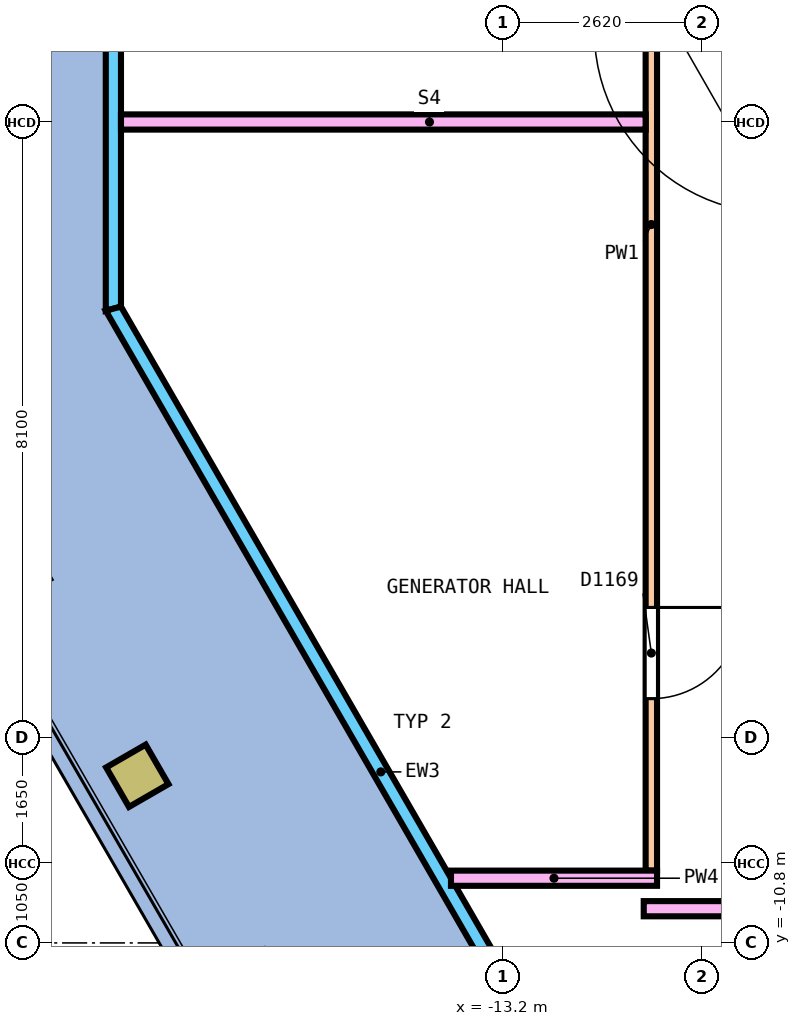
"""IFC4 building model, lengths in metres.
Left out: names, types, materials, properties, quantities, classifications, styles, units other than length and angle.
Written with IfcOpenShell. Run it as: python <this file> out.ifc"""

import sys

from ifc_helpers import new_model, si_unit, direction, frame, frame_2d, origin, origin_2d, place, context, subcontext, project, spatial, polyline, rectangle, hollow_rectangle, outline, extrude, element, fill, save


model = new_model("IFC4")
c1 = context("Model", 3, precision=1e-05, world=origin(), true_north=direction((0.0, 1.0)))
c2 = subcontext(c1, "Body", "Model", "MODEL_VIEW")
j1 = project(units=[si_unit("LENGTHUNIT", "METRE"), si_unit("PLANEANGLEUNIT", "RADIAN")], contexts=[c1])
p1 = place(None, origin())
s1 = spatial("IfcSite", under=j1, at=p1, CompositionType="ELEMENT")
p2 = place(p1, origin())
s2 = spatial("IfcBuilding", under=s1, at=p2, CompositionType="ELEMENT")
p3 = place(p2, frame((0.0, 0.0, 344.6)))
s3 = spatial("IfcBuildingStorey", under=s2, at=p3, CompositionType="ELEMENT", Elevation=344.6)
p4 = place(p3, frame((-18.013, -8.601, 0.0), z_axis=(0.0, 0.0, 1.0), x_axis=(0.5, -0.866025403784, 0.0)))
e1 = element("IfcColumn", 1, at=p4, inside=s3, PredefinedType="COLUMN", context=c2, shape_type="SweptSolid", body=[
    extrude(hollow_rectangle(XDim=0.6, YDim=0.6, WallThickness=0.04, InnerFilletRadius=0.04, OuterFilletRadius=0.08, at=origin_2d()), origin(), (0.0, 0.0, 1.0), 4.0),
])
p5 = place(p3, frame((-18.327, 2.456, 0.0), z_axis=(0.0, 0.0, 1.0), x_axis=(0.0, -1.0, 0.0)))
e2 = element("IfcWall", 2, at=p5, inside=s3, PredefinedType="SOLIDWALL", context=c2, shape_type="SweptSolid", body=[
    extrude(outline(polyline([(-0.027, -0.1), (4.938, -0.1), (4.885, 0.1), (0.027, 0.1), (-0.027, -0.1)])), origin(), (0.0, 0.0, 1.0), 3.8),
])
p6 = place(p3, frame((-18.327, -2.456, 0.0), z_axis=(0.0, 0.0, 1.0), x_axis=(0.499991740577, -0.866030172312, 0.0)))
e3 = element("IfcWall", 3, at=p6, inside=s3, PredefinedType="SOLIDWALL", context=c2, shape_type="SweptSolid", body=[
    extrude(outline(polyline([(-0.027, -0.1), (14.101, -0.1), (14.047, 0.1), (0.027, 0.1), (-0.027, -0.1)])), origin(), (0.0, 0.0, 1.0), 3.8),
])
p7 = place(p3, frame((-11.25, -9.849, 0.0), z_axis=(0.0, 0.0, 1.0), x_axis=(0.0, 1.0, 0.0)))
e4 = element("IfcWall", 4, at=p7, inside=s3, PredefinedType="PARTITIONING", context=c2, shape_type="SweptSolid", body=[
    extrude(rectangle(XDim=17.0, YDim=0.15, at=frame_2d((8.5, 0.0))), origin(), (0.0, 0.0, 1.0), 3.3),
])
p8 = place(p7, frame((14.212, 0.0, 0.0)))
e5 = element("IfcOpeningElement", 5, at=p8, cuts=e4, PredefinedType="OPENING", context=c2, shape_type="SweptSolid", body=[
    extrude(rectangle(XDim=1.2, YDim=2.1, at=frame_2d((0.6, 1.05))), frame((0.0, 0.085, 0.0), z_axis=(0.0, -1.0, 0.0), x_axis=(1.0, 0.0, 0.0)), (0.0, 0.0, 1.0), 0.17),
])
p9 = place(p7, frame((2.262, 0.0, 0.0)))
e6 = element("IfcOpeningElement", 6, at=p9, cuts=e4, PredefinedType="OPENING", context=c2, shape_type="SweptSolid", body=[
    extrude(rectangle(XDim=1.2, YDim=2.1, at=frame_2d((0.6, 1.05))), frame((0.0, 0.085, 0.0), z_axis=(0.0, -1.0, 0.0), x_axis=(1.0, 0.0, 0.0)), (0.0, 0.0, 1.0), 0.17),
])
p10 = place(p3, frame((-11.35, -10.35, 0.0), z_axis=(0.0, 0.0, 1.0), x_axis=(1.0, 0.0, 0.0)))
e7 = element("IfcWall", 7, at=p10, inside=s3, PredefinedType="PARTITIONING", context=c2, shape_type="SweptSolid", body=[
    extrude(rectangle(XDim=22.7, YDim=0.2, at=frame_2d((11.35, 0.0))), origin(), (0.0, 0.0, 1.0), 3.8),
])
p11 = place(p10, frame((13.84, 0.0, 0.0)))
e8 = element("IfcOpeningElement", 8, at=p11, cuts=e7, PredefinedType="OPENING", context=c2, shape_type="SweptSolid", body=[
    extrude(rectangle(XDim=1.2, YDim=2.1, at=frame_2d((0.6, 1.05))), frame((0.0, 0.11, 0.0), z_axis=(0.0, -1.0, 0.0), x_axis=(1.0, 0.0, 0.0)), (0.0, 0.0, 1.0), 0.22),
])
p12 = place(p3, frame((-18.228, 0.0, 0.0), z_axis=(0.0, 0.0, 1.0), x_axis=(1.0, 0.0, 0.0)))
e9 = element("IfcWall", 9, at=p12, inside=s3, PredefinedType="PARTITIONING", context=c2, shape_type="SweptSolid", body=[
    extrude(rectangle(XDim=6.903, YDim=0.2, at=frame_2d((3.451, 0.0))), origin(), (0.0, 0.0, 1.0), 3.3),
])
p13 = place(p3, frame((-13.886, -9.949, 0.0), z_axis=(0.0, 0.0, 1.0), x_axis=(1.0, 0.0, 0.0)))
e10 = element("IfcWall", 10, at=p13, inside=s3, PredefinedType="PARTITIONING", context=c2, shape_type="SweptSolid", body=[
    extrude(rectangle(XDim=2.711, YDim=0.2, at=frame_2d((1.355, 0.0))), origin(), (0.0, 0.0, 1.0), 3.8),
])
p14 = place(p9, origin())
e11 = element("IfcDoor", 11, at=p14, inside=s3, OperationType="DOUBLE_DOOR_SINGLE_SWING", PredefinedType="DOOR", context=c2, shape_type="SweptSolid", body=[
    extrude(rectangle(XDim=1.2, YDim=2.1, at=frame_2d((0.6, 1.05))), frame((0.0, 0.025, 0.0), z_axis=(0.0, -1.0, 0.0), x_axis=(1.0, 0.0, 0.0)), (0.0, 0.0, 1.0), 0.05),
])
fill(e6, e11)
save(model, sys.argv[1])
